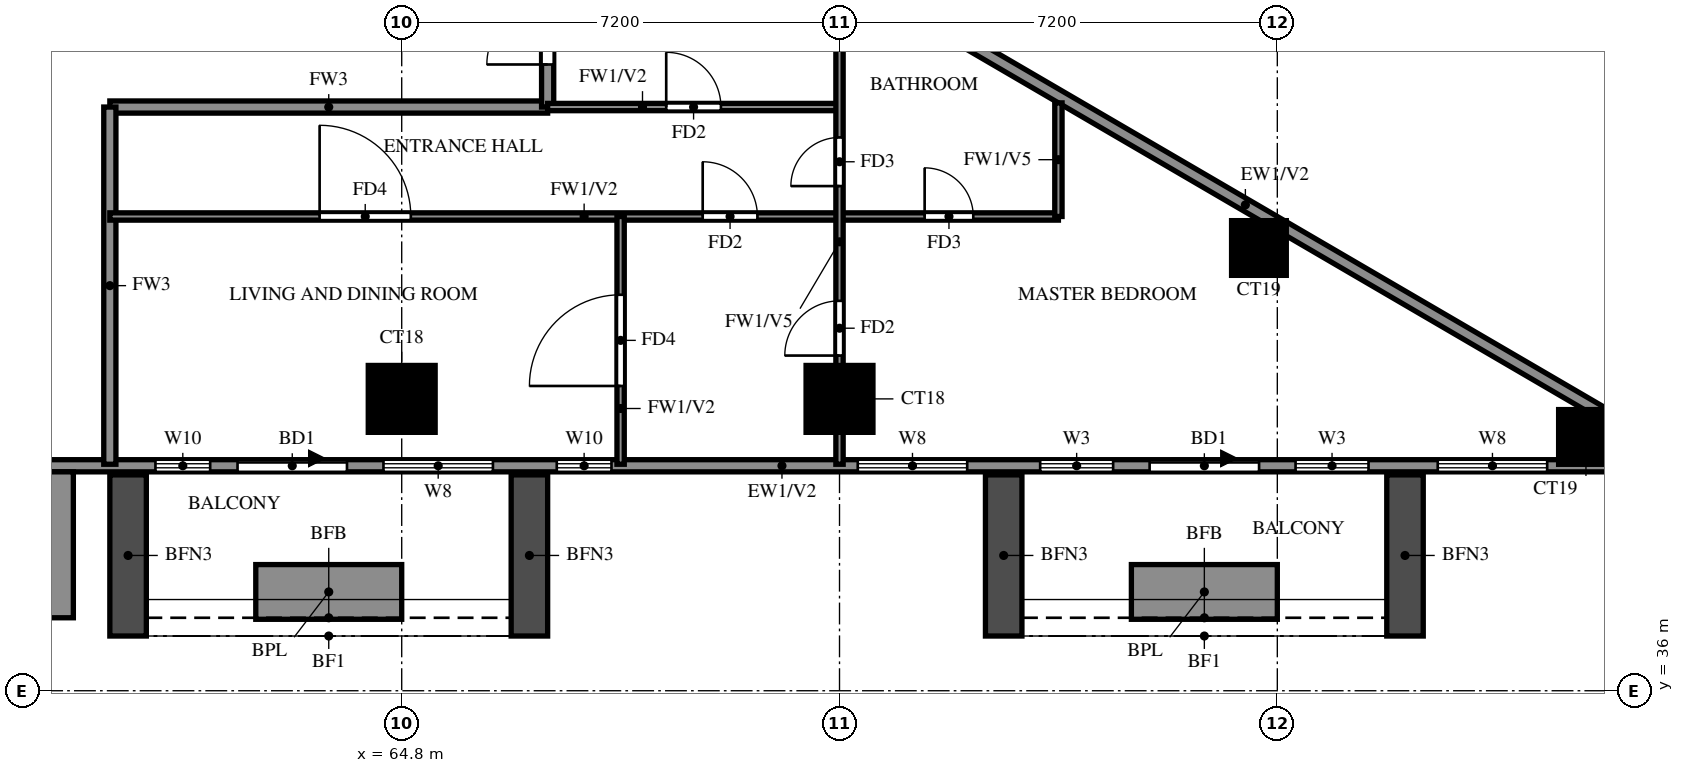
"""IFC4 building model, lengths in metres.
Left out: names, types, materials, properties, quantities, classifications, styles, units other than length and angle.
Written with IfcOpenShell. Run it as: python <this file> out.ifc"""

import sys

from ifc_helpers import new_model, si_unit, direction, frame, frame_2d, origin, origin_2d, place, context, subcontext, project, spatial, rectangle, extrude, source, transform, mapped, element, fill, save


model = new_model("IFC4")
c1 = context("Model", 3, precision=1e-05, world=origin(), true_north=direction((0.0, 1.0)))
c2 = subcontext(c1, "Body", "Model", "MODEL_VIEW")
j1 = project(units=[si_unit("LENGTHUNIT", "METRE"), si_unit("PLANEANGLEUNIT", "RADIAN")], contexts=[c1])
p1 = place(None, origin())
s1 = spatial("IfcSite", under=j1, at=p1, CompositionType="ELEMENT")
p2 = place(p1, origin())
s2 = spatial("IfcBuilding", under=s1, at=p2, CompositionType="ELEMENT")
p3 = place(p2, frame((0.0, 0.0, 130.5)))
s3 = spatial("IfcBuildingStorey", under=s2, at=p3, CompositionType="ELEMENT", Elevation=130.5)
m1 = source(origin(), c2, "Body", "SweptSolid", [
    extrude(rectangle(XDim=0.9, YDim=0.9, at=origin_2d()), origin(), (0.0, 0.0, 1.0), 3.2),
])
p4 = place(p3, frame((84.276, 40.174, 0.0), z_axis=(0.0, 0.0, 1.0), x_axis=(1.0, 0.0, 0.0)))
e1 = element("IfcColumn", 1, at=p4, inside=s3, PredefinedType="COLUMN", context=c2, shape_type="MappedRepresentation", body=[
    mapped(m1, transform((0.0, 0.0, 0.0))),
])
m2 = source(origin(), c2, "Body", "SweptSolid", [
    extrude(rectangle(XDim=1.1, YDim=1.1, at=origin_2d()), origin(), (0.0, 0.0, 1.0), 3.2),
])
for number, where, z_axis, x_axis in (
    (2, (64.8, 40.8, 0.0), (0.0, 0.0, 1.0), (1.0, 0.0, 0.0)),
    (3, (72.0, 40.8, 0.0), (0.0, 0.0, 1.0), (1.0, 0.0, 0.0)),
):
    element("IfcColumn", number, at=place(p3, frame(where, z_axis=z_axis, x_axis=x_axis)), inside=s3, PredefinedType="COLUMN", context=c2, shape_type="MappedRepresentation", body=[
        mapped(m2, transform((0.0, 0.0, 0.0))),
    ])
p5 = place(p3, frame((78.898, 43.282, 0.0), z_axis=(0.0, 0.0, 1.0), x_axis=(1.0, 0.0, 0.0)))
e4 = element("IfcColumn", 4, at=p5, inside=s3, PredefinedType="COLUMN", context=c2, shape_type="MappedRepresentation", body=[
    mapped(m1, transform((0.0, 0.0, 0.0))),
])
p6 = place(p3, frame((85.719, 39.881, 0.0), z_axis=(0.0, 0.0, 1.0), x_axis=(-0.86377618652, 0.503875678716, 0.0)))
e5 = element("IfcWall", 5, at=p6, inside=s3, PredefinedType="SOLIDWALL", context=c2, shape_type="SweptSolid", body=[
    extrude(rectangle(XDim=16.311, YDim=0.2, at=frame_2d((8.156, 0.0))), origin(), (0.0, 0.0, 1.0), 3.2),
])
p7 = place(p6, frame((13.326, 0.0, 1.5)))
e6 = element("IfcOpeningElement", 6, at=p7, cuts=e5, PredefinedType="OPENING", context=c2, shape_type="SweptSolid", body=[
    extrude(rectangle(XDim=0.9, YDim=0.9, at=frame_2d((0.45, 0.45))), frame((0.0, 0.11, 0.0), z_axis=(0.0, -1.0, 0.0), x_axis=(1.0, 0.0, 0.0)), (0.0, 0.0, 1.0), 0.22),
])
p8 = place(p3, frame((58.8, 39.7, 0.0), z_axis=(0.0, 0.0, 1.0), x_axis=(1.0, 0.0, 0.0)))
e7 = element("IfcWall", 7, at=p8, inside=s3, PredefinedType="SOLIDWALL", context=c2, shape_type="SweptSolid", body=[
    extrude(rectangle(XDim=27.23, YDim=0.2, at=frame_2d((13.615, 0.0))), origin(), (0.0, 0.0, 1.0), 3.2),
])
p9 = place(p8, frame((3.3, 0.0, 0.0)))
e8 = element("IfcOpeningElement", 8, at=p9, cuts=e7, PredefinedType="OPENING", context=c2, shape_type="SweptSolid", body=[
    extrude(rectangle(XDim=1.8, YDim=2.4, at=frame_2d((0.9, 1.2))), frame((0.0, 0.11, 0.0), z_axis=(0.0, -1.0, 0.0), x_axis=(1.0, 0.0, 0.0)), (0.0, 0.0, 1.0), 0.22),
])
p10 = place(p8, frame((18.3, 0.0, 0.0)))
e9 = element("IfcOpeningElement", 9, at=p10, cuts=e7, PredefinedType="OPENING", context=c2, shape_type="SweptSolid", body=[
    extrude(rectangle(XDim=1.8, YDim=2.4, at=frame_2d((0.9, 1.2))), frame((0.0, 0.11, 0.0), z_axis=(0.0, -1.0, 0.0), x_axis=(1.0, 0.0, 0.0)), (0.0, 0.0, 1.0), 0.22),
])
p11 = place(p8, frame((1.95, 0.0, 0.6)))
e10 = element("IfcOpeningElement", 10, at=p11, cuts=e7, PredefinedType="OPENING", context=c2, shape_type="SweptSolid", body=[
    extrude(rectangle(XDim=0.9, YDim=2.4, at=frame_2d((0.45, 1.2))), frame((0.0, 0.11, 0.0), z_axis=(0.0, -1.0, 0.0), x_axis=(1.0, 0.0, 0.0)), (0.0, 0.0, 1.0), 0.22),
])
p12 = place(p8, frame((5.7, 0.0, 0.6)))
e11 = element("IfcOpeningElement", 11, at=p12, cuts=e7, PredefinedType="OPENING", context=c2, shape_type="SweptSolid", body=[
    extrude(rectangle(XDim=1.8, YDim=2.4, at=frame_2d((0.9, 1.2))), frame((0.0, 0.11, 0.0), z_axis=(0.0, -1.0, 0.0), x_axis=(1.0, 0.0, 0.0)), (0.0, 0.0, 1.0), 0.22),
])
p13 = place(p8, frame((8.55, 0.0, 0.6)))
e12 = element("IfcOpeningElement", 12, at=p13, cuts=e7, PredefinedType="OPENING", context=c2, shape_type="SweptSolid", body=[
    extrude(rectangle(XDim=0.9, YDim=2.4, at=frame_2d((0.45, 1.2))), frame((0.0, 0.11, 0.0), z_axis=(0.0, -1.0, 0.0), x_axis=(1.0, 0.0, 0.0)), (0.0, 0.0, 1.0), 0.22),
])
p14 = place(p8, frame((13.5, 0.0, 0.6)))
e13 = element("IfcOpeningElement", 13, at=p14, cuts=e7, PredefinedType="OPENING", context=c2, shape_type="SweptSolid", body=[
    extrude(rectangle(XDim=1.8, YDim=2.4, at=frame_2d((0.9, 1.2))), frame((0.0, 0.11, 0.0), z_axis=(0.0, -1.0, 0.0), x_axis=(1.0, 0.0, 0.0)), (0.0, 0.0, 1.0), 0.22),
])
p15 = place(p8, frame((16.5, 0.0, 0.6)))
e14 = element("IfcOpeningElement", 14, at=p15, cuts=e7, PredefinedType="OPENING", context=c2, shape_type="SweptSolid", body=[
    extrude(rectangle(XDim=1.2, YDim=2.4, at=frame_2d((0.6, 1.2))), frame((0.0, 0.11, 0.0), z_axis=(0.0, -1.0, 0.0), x_axis=(1.0, 0.0, 0.0)), (0.0, 0.0, 1.0), 0.22),
])
p16 = place(p8, frame((20.7, 0.0, 0.6)))
e15 = element("IfcOpeningElement", 15, at=p16, cuts=e7, PredefinedType="OPENING", context=c2, shape_type="SweptSolid", body=[
    extrude(rectangle(XDim=1.2, YDim=2.4, at=frame_2d((0.6, 1.2))), frame((0.0, 0.11, 0.0), z_axis=(0.0, -1.0, 0.0), x_axis=(1.0, 0.0, 0.0)), (0.0, 0.0, 1.0), 0.22),
])
p17 = place(p8, frame((23.038, 0.0, 0.6)))
e16 = element("IfcOpeningElement", 16, at=p17, cuts=e7, PredefinedType="OPENING", context=c2, shape_type="SweptSolid", body=[
    extrude(rectangle(XDim=1.8, YDim=2.4, at=frame_2d((0.9, 1.2))), frame((0.0, 0.11, 0.0), z_axis=(0.0, -1.0, 0.0), x_axis=(1.0, 0.0, 0.0)), (0.0, 0.0, 1.0), 0.22),
])
p18 = place(p8, frame((26.003, 0.0, 0.6)))
e17 = element("IfcOpeningElement", 17, at=p18, cuts=e7, PredefinedType="OPENING", context=c2, shape_type="SweptSolid", body=[
    extrude(rectangle(XDim=0.9, YDim=2.4, at=frame_2d((0.45, 1.2))), frame((0.0, 0.11, 0.0), z_axis=(0.0, -1.0, 0.0), x_axis=(1.0, 0.0, 0.0)), (0.0, 0.0, 1.0), 0.22),
])
for number, where, z_axis, x_axis in (
    (18, (60.3, 39.55, 0.0), (0.0, 0.0, 1.0), (0.0, -1.0, 0.0)),
    (19, (66.9, 39.55, 0.0), (0.0, 0.0, 1.0), (0.0, -1.0, 0.0)),
):
    element("IfcWall", number, at=place(p3, frame(where, z_axis=z_axis, x_axis=x_axis)), inside=s3, PredefinedType="SOLIDWALL", context=c2, shape_type="SweptSolid", body=[
        extrude(rectangle(XDim=2.65, YDim=0.6, at=frame_2d((1.325, 0.0))), origin(), (0.0, 0.0, 1.0), 2.85),
    ])
p19 = place(p3, frame((62.4, 37.625, 0.0), z_axis=(0.0, 0.0, 1.0), x_axis=(1.0, 0.0, 0.0)))
e20 = element("IfcWall", 20, at=p19, inside=s3, PredefinedType="SOLIDWALL", context=c2, shape_type="SweptSolid", body=[
    extrude(rectangle(XDim=2.4, YDim=0.9, at=frame_2d((1.2, 0.0))), origin(), (0.0, 0.0, 1.0), 0.9),
])
for number, where, z_axis, x_axis in (
    (21, (74.7, 39.55, 0.0), (0.0, 0.0, 1.0), (0.0, -1.0, 0.0)),
    (22, (81.3, 39.55, 0.0), (0.0, 0.0, 1.0), (0.0, -1.0, 0.0)),
):
    element("IfcWall", number, at=place(p3, frame(where, z_axis=z_axis, x_axis=x_axis)), inside=s3, PredefinedType="SOLIDWALL", context=c2, shape_type="SweptSolid", body=[
        extrude(rectangle(XDim=2.65, YDim=0.6, at=frame_2d((1.325, 0.0))), origin(), (0.0, 0.0, 1.0), 2.85),
    ])
p20 = place(p3, frame((76.8, 37.625, 0.0), z_axis=(0.0, 0.0, 1.0), x_axis=(1.0, 0.0, 0.0)))
e23 = element("IfcWall", 23, at=p20, inside=s3, PredefinedType="SOLIDWALL", context=c2, shape_type="SweptSolid", body=[
    extrude(rectangle(XDim=2.4, YDim=0.9, at=frame_2d((1.2, 0.0))), origin(), (0.0, 0.0, 1.0), 0.9),
])
p21 = place(p3, frame((58.5, 37.2, -0.3), z_axis=(0.0, 0.0, 1.0), x_axis=(0.0, 1.0, 0.0)))
e24 = element("IfcWall", 24, at=p21, inside=s3, PredefinedType="SOLIDWALL", context=c2, shape_type="SweptSolid", body=[
    extrude(rectangle(XDim=2.4, YDim=1.8, at=frame_2d((1.2, 0.0))), origin(), (0.0, 0.0, 1.0), 3.8),
])
p22 = place(p3, frame((60.0, 45.6, 0.0), z_axis=(0.0, 0.0, 1.0), x_axis=(1.0, 0.0, 0.0)))
e25 = element("IfcWall", 25, at=p22, inside=s3, PredefinedType="SOLIDWALL", context=c2, shape_type="SweptSolid", body=[
    extrude(rectangle(XDim=7.2, YDim=0.2, at=frame_2d((3.6, 0.0))), origin(), (0.0, 0.0, 1.0), 3.2),
])
p23 = place(p3, frame((60.0, 39.725, 0.0), z_axis=(0.0, 0.0, 1.0), x_axis=(0.0, 1.0, 0.0)))
e26 = element("IfcWall", 26, at=p23, inside=s3, PredefinedType="SOLIDWALL", context=c2, shape_type="SweptSolid", body=[
    extrude(rectangle(XDim=5.875, YDim=0.2, at=frame_2d((2.938, 0.0))), origin(), (0.0, 0.0, 1.0), 3.2),
])
p24 = place(p3, frame((67.2, 45.6, 0.0), z_axis=(0.0, 0.0, 1.0), x_axis=(0.0, 1.0, 0.0)))
e27 = element("IfcWall", 27, at=p24, inside=s3, PredefinedType="SOLIDWALL", context=c2, shape_type="SweptSolid", body=[
    extrude(rectangle(XDim=12.0, YDim=0.2, at=frame_2d((6.0, 0.0))), origin(), (0.0, 0.0, 1.0), 3.2),
])
p25 = place(p24, frame((10.3, 0.0, 0.0)))
e28 = element("IfcOpeningElement", 28, at=p25, cuts=e27, PredefinedType="OPENING", context=c2, shape_type="SweptSolid", body=[
    extrude(rectangle(XDim=1.0, YDim=2.1, at=frame_2d((0.5, 1.05))), frame((0.0, 0.11, 0.0), z_axis=(0.0, -1.0, 0.0), x_axis=(1.0, 0.0, 0.0)), (0.0, 0.0, 1.0), 0.22),
])
p26 = place(p24, frame((0.7, 0.0, 0.0)))
e29 = element("IfcOpeningElement", 29, at=p26, cuts=e27, PredefinedType="OPENING", context=c2, shape_type="SweptSolid", body=[
    extrude(rectangle(XDim=1.0, YDim=2.1, at=frame_2d((0.5, 1.05))), frame((0.0, 0.11, 0.0), z_axis=(0.0, -1.0, 0.0), x_axis=(1.0, 0.0, 0.0)), (0.0, 0.0, 1.0), 0.22),
])
p27 = place(p3, frame((60.0, 43.8, 0.0), z_axis=(0.0, 0.0, 1.0), x_axis=(1.0, 0.0, 0.0)))
e30 = element("IfcWall", 30, at=p27, inside=s3, PredefinedType="PARTITIONING", context=c2, shape_type="SweptSolid", body=[
    extrude(rectangle(XDim=15.6, YDim=0.12, at=frame_2d((7.8, 0.0))), origin(), (0.0, 0.0, 1.0), 3.2),
])
p28 = place(p27, frame((9.75, 0.0, 0.0)))
e31 = element("IfcOpeningElement", 31, at=p28, cuts=e30, PredefinedType="OPENING", context=c2, shape_type="SweptSolid", body=[
    extrude(rectangle(XDim=0.9, YDim=2.1, at=frame_2d((0.45, 1.05))), frame((0.0, 0.07, 0.0), z_axis=(0.0, -1.0, 0.0), x_axis=(1.0, 0.0, 0.0)), (0.0, 0.0, 1.0), 0.14),
])
p29 = place(p27, frame((3.45, 0.0, 0.0)))
e32 = element("IfcOpeningElement", 32, at=p29, cuts=e30, PredefinedType="OPENING", context=c2, shape_type="SweptSolid", body=[
    extrude(rectangle(XDim=1.5, YDim=2.1, at=frame_2d((0.75, 1.05))), frame((0.0, 0.07, 0.0), z_axis=(0.0, -1.0, 0.0), x_axis=(1.0, 0.0, 0.0)), (0.0, 0.0, 1.0), 0.14),
])
p30 = place(p27, frame((13.4, 0.0, 0.0)))
e33 = element("IfcOpeningElement", 33, at=p30, cuts=e30, PredefinedType="OPENING", context=c2, shape_type="SweptSolid", body=[
    extrude(rectangle(XDim=0.8, YDim=2.1, at=frame_2d((0.4, 1.05))), frame((0.0, 0.07, 0.0), z_axis=(0.0, -1.0, 0.0), x_axis=(1.0, 0.0, 0.0)), (0.0, 0.0, 1.0), 0.14),
])
p31 = place(p3, frame((67.2, 45.6, 0.0), z_axis=(0.0, 0.0, 1.0), x_axis=(1.0, 0.0, 0.0)))
e34 = element("IfcWall", 34, at=p31, inside=s3, PredefinedType="PARTITIONING", context=c2, shape_type="SweptSolid", body=[
    extrude(rectangle(XDim=4.8, YDim=0.12, at=frame_2d((2.4, 0.0))), origin(), (0.0, 0.0, 1.0), 3.2),
])
p32 = place(p31, frame((1.95, 0.0, 0.0)))
e35 = element("IfcOpeningElement", 35, at=p32, cuts=e34, PredefinedType="OPENING", context=c2, shape_type="SweptSolid", body=[
    extrude(rectangle(XDim=0.9, YDim=2.1, at=frame_2d((0.45, 1.05))), frame((0.0, 0.07, 0.0), z_axis=(0.0, -1.0, 0.0), x_axis=(1.0, 0.0, 0.0)), (0.0, 0.0, 1.0), 0.14),
])
p33 = place(p3, frame((68.4, 39.725, 0.0), z_axis=(0.0, 0.0, 1.0), x_axis=(0.0, 1.0, 0.0)))
e36 = element("IfcWall", 36, at=p33, inside=s3, PredefinedType="PARTITIONING", context=c2, shape_type="SweptSolid", body=[
    extrude(rectangle(XDim=4.075, YDim=0.12, at=frame_2d((2.038, 0.0))), origin(), (0.0, 0.0, 1.0), 3.2),
])
p34 = place(p33, frame((1.288, 0.0, 0.0)))
e37 = element("IfcOpeningElement", 37, at=p34, cuts=e36, PredefinedType="OPENING", context=c2, shape_type="SweptSolid", body=[
    extrude(rectangle(XDim=1.5, YDim=2.1, at=frame_2d((0.75, 1.05))), frame((0.0, 0.07, 0.0), z_axis=(0.0, -1.0, 0.0), x_axis=(1.0, 0.0, 0.0)), (0.0, 0.0, 1.0), 0.14),
])
p35 = place(p3, frame((72.0, 39.725, 0.0), z_axis=(0.0, 0.0, 1.0), x_axis=(0.0, 1.0, 0.0)))
e38 = element("IfcWall", 38, at=p35, inside=s3, PredefinedType="PARTITIONING", context=c2, shape_type="SweptSolid", body=[
    extrude(rectangle(XDim=8.13, YDim=0.12, at=frame_2d((4.065, 0.0))), origin(), (0.0, 0.0, 1.0), 2.3),
])
p36 = place(p35, frame((1.788, 0.0, 0.0)))
e39 = element("IfcOpeningElement", 39, at=p36, cuts=e38, PredefinedType="OPENING", context=c2, shape_type="SweptSolid", body=[
    extrude(rectangle(XDim=0.9, YDim=2.1, at=frame_2d((0.45, 1.05))), frame((0.0, 0.07, 0.0), z_axis=(0.0, -1.0, 0.0), x_axis=(1.0, 0.0, 0.0)), (0.0, 0.0, 1.0), 0.14),
])
p37 = place(p35, frame((4.575, 0.0, 0.0)))
e40 = element("IfcOpeningElement", 40, at=p37, cuts=e38, PredefinedType="OPENING", context=c2, shape_type="SweptSolid", body=[
    extrude(rectangle(XDim=0.8, YDim=2.1, at=frame_2d((0.4, 1.05))), frame((0.0, 0.07, 0.0), z_axis=(0.0, -1.0, 0.0), x_axis=(1.0, 0.0, 0.0)), (0.0, 0.0, 1.0), 0.14),
])
p38 = place(p3, frame((75.6, 43.8, 0.0), z_axis=(0.0, 0.0, 1.0), x_axis=(0.0, 1.0, 0.0)))
e41 = element("IfcWall", 41, at=p38, inside=s3, PredefinedType="PARTITIONING", context=c2, shape_type="SweptSolid", body=[
    extrude(rectangle(XDim=1.868, YDim=0.12, at=frame_2d((0.934, 0.0))), origin(), (0.0, 0.0, 1.0), 2.3),
])
p39 = place(p9, origin())
e42 = element("IfcDoor", 42, at=p39, inside=s3, OperationType="DOUBLE_DOOR_SLIDING", PredefinedType="DOOR", context=c2, shape_type="SweptSolid", body=[
    extrude(rectangle(XDim=1.8, YDim=2.4, at=frame_2d((0.9, 1.2))), frame((0.0, 0.025, 0.0), z_axis=(0.0, -1.0, 0.0), x_axis=(1.0, 0.0, 0.0)), (0.0, 0.0, 1.0), 0.05),
])
fill(e8, e42)
p40 = place(p10, origin())
e43 = element("IfcDoor", 43, at=p40, inside=s3, OperationType="DOUBLE_DOOR_SLIDING", PredefinedType="DOOR", context=c2, shape_type="SweptSolid", body=[
    extrude(rectangle(XDim=1.8, YDim=2.4, at=frame_2d((0.9, 1.2))), frame((0.0, 0.025, 0.0), z_axis=(0.0, -1.0, 0.0), x_axis=(1.0, 0.0, 0.0)), (0.0, 0.0, 1.0), 0.05),
])
fill(e9, e43)
p41 = place(p11, origin())
e44 = element("IfcWindow", 44, at=p41, inside=s3, PartitioningType="SINGLE_PANEL", PredefinedType="WINDOW", context=c2, shape_type="SweptSolid", body=[
    extrude(rectangle(XDim=0.9, YDim=2.4, at=frame_2d((0.45, 1.2))), frame((0.0, 0.03, 0.0), z_axis=(0.0, -1.0, 0.0), x_axis=(1.0, 0.0, 0.0)), (0.0, 0.0, 1.0), 0.06),
])
fill(e10, e44)
p42 = place(p12, origin())
e45 = element("IfcWindow", 45, at=p42, inside=s3, PartitioningType="DOUBLE_PANEL_VERTICAL", PredefinedType="WINDOW", context=c2, shape_type="SweptSolid", body=[
    extrude(rectangle(XDim=1.8, YDim=2.4, at=frame_2d((0.9, 1.2))), frame((0.0, 0.03, 0.0), z_axis=(0.0, -1.0, 0.0), x_axis=(1.0, 0.0, 0.0)), (0.0, 0.0, 1.0), 0.06),
])
fill(e11, e45)
p43 = place(p13, origin())
e46 = element("IfcWindow", 46, at=p43, inside=s3, PartitioningType="SINGLE_PANEL", PredefinedType="WINDOW", context=c2, shape_type="SweptSolid", body=[
    extrude(rectangle(XDim=0.9, YDim=2.4, at=frame_2d((0.45, 1.2))), frame((0.0, 0.03, 0.0), z_axis=(0.0, -1.0, 0.0), x_axis=(1.0, 0.0, 0.0)), (0.0, 0.0, 1.0), 0.06),
])
fill(e12, e46)
p44 = place(p14, origin())
e47 = element("IfcWindow", 47, at=p44, inside=s3, PartitioningType="DOUBLE_PANEL_VERTICAL", PredefinedType="WINDOW", context=c2, shape_type="SweptSolid", body=[
    extrude(rectangle(XDim=1.8, YDim=2.4, at=frame_2d((0.9, 1.2))), frame((0.0, 0.03, 0.0), z_axis=(0.0, -1.0, 0.0), x_axis=(1.0, 0.0, 0.0)), (0.0, 0.0, 1.0), 0.06),
])
fill(e13, e47)
p45 = place(p15, origin())
e48 = element("IfcWindow", 48, at=p45, inside=s3, PartitioningType="SINGLE_PANEL", PredefinedType="WINDOW", context=c2, shape_type="SweptSolid", body=[
    extrude(rectangle(XDim=1.2, YDim=2.4, at=frame_2d((0.6, 1.2))), frame((0.0, 0.03, 0.0), z_axis=(0.0, -1.0, 0.0), x_axis=(1.0, 0.0, 0.0)), (0.0, 0.0, 1.0), 0.06),
])
fill(e14, e48)
p46 = place(p16, origin())
e49 = element("IfcWindow", 49, at=p46, inside=s3, PartitioningType="SINGLE_PANEL", PredefinedType="WINDOW", context=c2, shape_type="SweptSolid", body=[
    extrude(rectangle(XDim=1.2, YDim=2.4, at=frame_2d((0.6, 1.2))), frame((0.0, 0.03, 0.0), z_axis=(0.0, -1.0, 0.0), x_axis=(1.0, 0.0, 0.0)), (0.0, 0.0, 1.0), 0.06),
])
fill(e15, e49)
p47 = place(p17, origin())
e50 = element("IfcWindow", 50, at=p47, inside=s3, PartitioningType="DOUBLE_PANEL_VERTICAL", PredefinedType="WINDOW", context=c2, shape_type="SweptSolid", body=[
    extrude(rectangle(XDim=1.8, YDim=2.4, at=frame_2d((0.9, 1.2))), frame((0.0, 0.03, 0.0), z_axis=(0.0, -1.0, 0.0), x_axis=(1.0, 0.0, 0.0)), (0.0, 0.0, 1.0), 0.06),
])
fill(e16, e50)
p48 = place(p34, origin())
e51 = element("IfcDoor", 51, at=p48, inside=s3, OperationType="SINGLE_SWING_RIGHT", PredefinedType="DOOR", context=c2, shape_type="SweptSolid", body=[
    extrude(rectangle(XDim=1.5, YDim=2.1, at=frame_2d((0.75, 1.05))), frame((0.0, 0.025, 0.0), z_axis=(0.0, -1.0, 0.0), x_axis=(1.0, 0.0, 0.0)), (0.0, 0.0, 1.0), 0.05),
])
fill(e37, e51)
p49 = place(p32, origin())
e52 = element("IfcDoor", 52, at=p49, inside=s3, OperationType="SINGLE_SWING_LEFT", PredefinedType="DOOR", context=c2, shape_type="SweptSolid", body=[
    extrude(rectangle(XDim=0.9, YDim=2.1, at=frame_2d((0.45, 1.05))), frame((0.0, 0.025, 0.0), z_axis=(0.0, -1.0, 0.0), x_axis=(1.0, 0.0, 0.0)), (0.0, 0.0, 1.0), 0.05),
])
fill(e35, e52)
p50 = place(p26, origin())
e53 = element("IfcDoor", 53, at=p50, inside=s3, OperationType="SINGLE_SWING_LEFT", PredefinedType="DOOR", context=c2, shape_type="SweptSolid", body=[
    extrude(rectangle(XDim=1.0, YDim=2.1, at=frame_2d((0.5, 1.05))), frame((0.0, 0.025, 0.0), z_axis=(0.0, -1.0, 0.0), x_axis=(1.0, 0.0, 0.0)), (0.0, 0.0, 1.0), 0.05),
])
fill(e29, e53)
p51 = place(p28, origin())
e54 = element("IfcDoor", 54, at=p51, inside=s3, OperationType="SINGLE_SWING_RIGHT", PredefinedType="DOOR", context=c2, shape_type="SweptSolid", body=[
    extrude(rectangle(XDim=0.9, YDim=2.1, at=frame_2d((0.45, 1.05))), frame((0.0, 0.025, 0.0), z_axis=(0.0, -1.0, 0.0), x_axis=(1.0, 0.0, 0.0)), (0.0, 0.0, 1.0), 0.05),
])
fill(e31, e54)
p52 = place(p29, origin())
e55 = element("IfcDoor", 55, at=p52, inside=s3, OperationType="SINGLE_SWING_LEFT", PredefinedType="DOOR", context=c2, shape_type="SweptSolid", body=[
    extrude(rectangle(XDim=1.5, YDim=2.1, at=frame_2d((0.75, 1.05))), frame((0.0, 0.025, 0.0), z_axis=(0.0, -1.0, 0.0), x_axis=(1.0, 0.0, 0.0)), (0.0, 0.0, 1.0), 0.05),
])
fill(e32, e55)
p53 = place(p36, origin())
e56 = element("IfcDoor", 56, at=p53, inside=s3, OperationType="SINGLE_SWING_RIGHT", PredefinedType="DOOR", context=c2, shape_type="SweptSolid", body=[
    extrude(rectangle(XDim=0.9, YDim=2.1, at=frame_2d((0.45, 1.05))), frame((0.0, 0.025, 0.0), z_axis=(0.0, -1.0, 0.0), x_axis=(1.0, 0.0, 0.0)), (0.0, 0.0, 1.0), 0.05),
])
fill(e39, e56)
p54 = place(p37, origin())
e57 = element("IfcDoor", 57, at=p54, inside=s3, OperationType="SINGLE_SWING_RIGHT", PredefinedType="DOOR", context=c2, shape_type="SweptSolid", body=[
    extrude(rectangle(XDim=0.8, YDim=2.1, at=frame_2d((0.4, 1.05))), frame((0.0, 0.025, 0.0), z_axis=(0.0, -1.0, 0.0), x_axis=(1.0, 0.0, 0.0)), (0.0, 0.0, 1.0), 0.05),
])
fill(e40, e57)
p55 = place(p30, origin())
e58 = element("IfcDoor", 58, at=p55, inside=s3, OperationType="SINGLE_SWING_LEFT", PredefinedType="DOOR", context=c2, shape_type="SweptSolid", body=[
    extrude(rectangle(XDim=0.8, YDim=2.1, at=frame_2d((0.4, 1.05))), frame((0.0, 0.025, 0.0), z_axis=(0.0, -1.0, 0.0), x_axis=(1.0, 0.0, 0.0)), (0.0, 0.0, 1.0), 0.05),
])
fill(e33, e58)
save(model, sys.argv[1])
